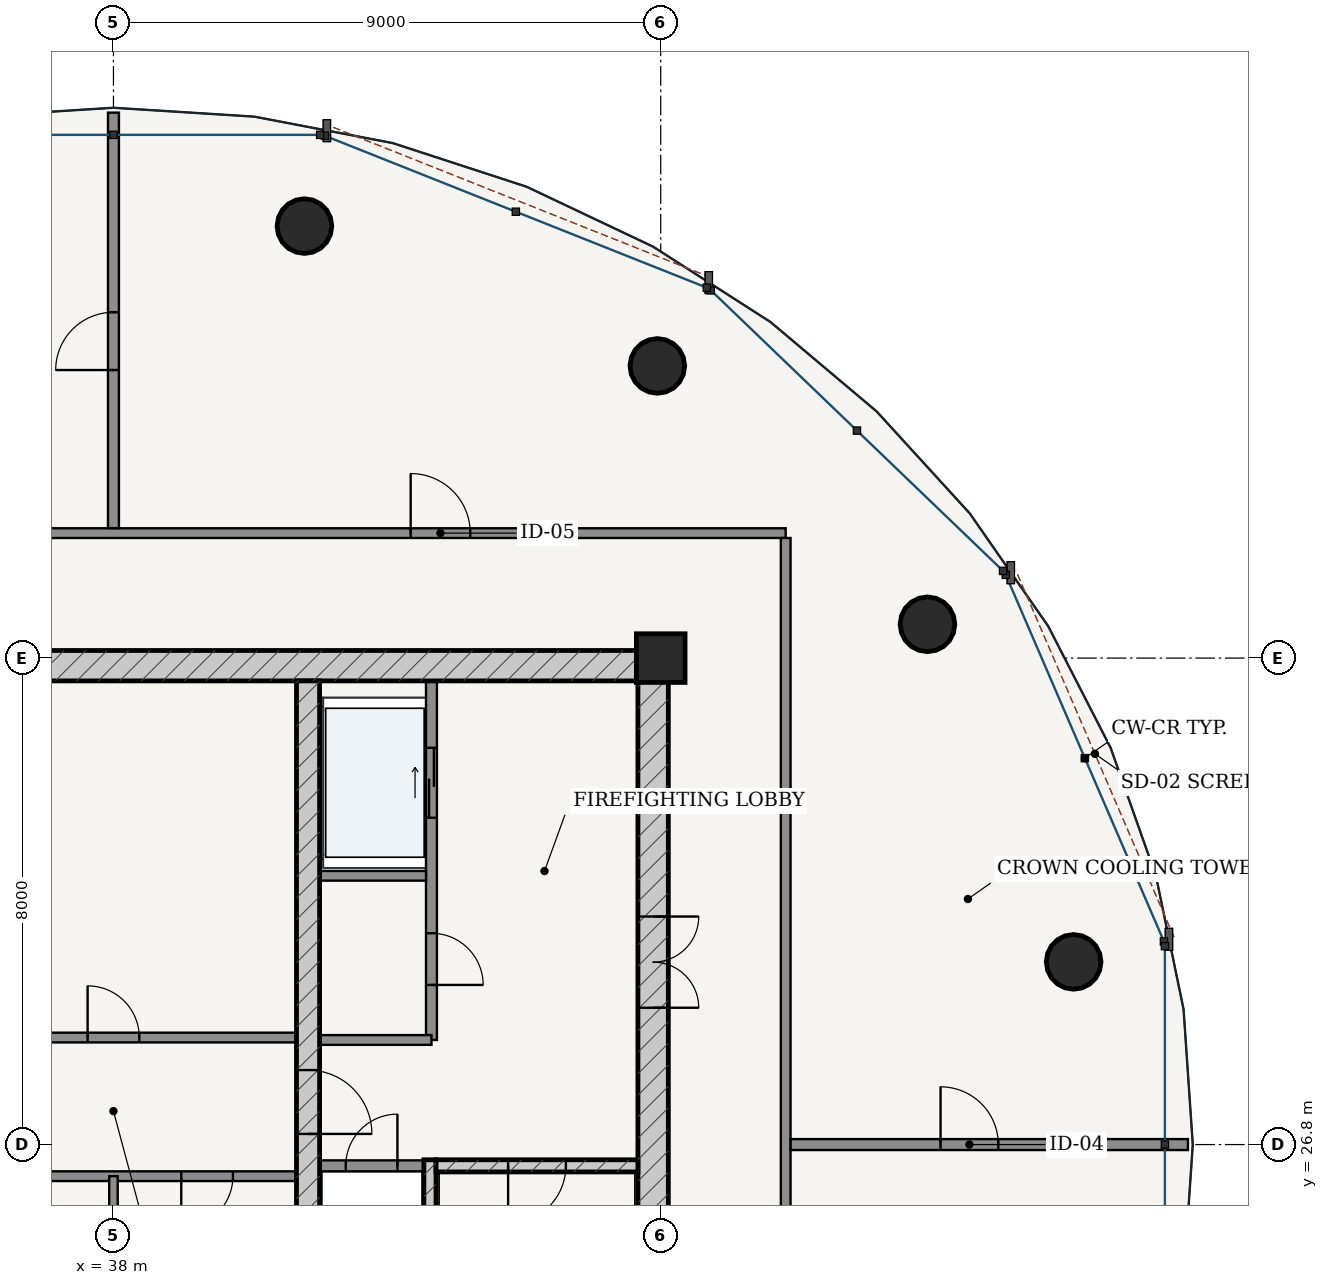
"""IFC4 building model, lengths in metres.
Left out: names, types, materials, properties, quantities, classifications, styles, units other than length and angle.
Written with IfcOpenShell. Run it as: python <this file> out.ifc"""

import sys

from ifc_helpers import new_model, si_unit, direction, frame, frame_2d, origin, origin_2d, place, context, subcontext, project, spatial, rectangle, hollow_circle, extrude, source, transform, mapped, element, fill, save


model = new_model("IFC4")
c1 = context("Model", 3, precision=1e-05, world=origin(), true_north=direction((-0.2419218956, 0.970295726276)))
c2 = subcontext(c1, "Body", "Model", "MODEL_VIEW")
j1 = project(units=[si_unit("LENGTHUNIT", "METRE"), si_unit("PLANEANGLEUNIT", "RADIAN")], contexts=[c1])
p1 = place(None, origin())
s1 = spatial("IfcSite", under=j1, at=p1, CompositionType="ELEMENT")
p2 = place(p1, origin())
s2 = spatial("IfcBuilding", under=s1, at=p2, CompositionType="ELEMENT")
p3 = place(p2, frame((0.0, 0.0, 316.5)))
s3 = spatial("IfcBuildingStorey", under=s2, at=p3, CompositionType="ELEMENT", Elevation=316.5)
p4 = place(p3, frame((47.0, 34.8, 0.0), z_axis=(0.0, 0.0, 1.0), x_axis=(1.0, 0.0, 0.0)))
e1 = element("IfcColumn", 1, at=p4, inside=s3, PredefinedType="COLUMN", context=c2, shape_type="SweptSolid", body=[
    extrude(rectangle(XDim=0.8, YDim=0.8, at=origin_2d()), origin(), (0.0, 0.0, 1.0), 5.2),
])
p5 = place(p3, frame((28.875, 34.675, 0.0), z_axis=(0.0, 0.0, 1.0), x_axis=(1.0, 0.0, 0.0)))
e2 = element("IfcWall", 2, at=p5, inside=s3, PredefinedType="SHEAR", context=c2, shape_type="SweptSolid", body=[
    extrude(rectangle(XDim=18.25, YDim=0.5, at=frame_2d((9.125, 0.0))), origin(), (0.0, 0.0, 1.0), 4.78),
])
p6 = place(p3, frame((46.875, 19.175, 0.0), z_axis=(0.0, 0.0, 1.0), x_axis=(0.0, 1.0, 0.0)))
e3 = element("IfcWall", 3, at=p6, inside=s3, PredefinedType="SHEAR", context=c2, shape_type="SweptSolid", body=[
    extrude(rectangle(XDim=15.25, YDim=0.5, at=frame_2d((7.625, 0.0))), origin(), (0.0, 0.0, 1.0), 4.78),
])
p7 = place(p6, frame((9.875, 0.0, 0.0)))
e4 = element("IfcOpeningElement", 4, at=p7, cuts=e3, PredefinedType="OPENING", context=c2, shape_type="SweptSolid", body=[
    extrude(rectangle(XDim=1.5, YDim=2.2, at=frame_2d((0.75, 1.1))), frame((0.0, 0.26, 0.0), z_axis=(0.0, -1.0, 0.0), x_axis=(1.0, 0.0, 0.0)), (0.0, 0.0, 1.0), 0.52),
])
p8 = place(p3, frame((43.205, 19.175, 0.0), z_axis=(0.0, 0.0, 1.0), x_axis=(0.0, 1.0, 0.0)))
e5 = element("IfcWall", 5, at=p8, inside=s3, PredefinedType="SOLIDWALL", context=c2, shape_type="SweptSolid", body=[
    extrude(rectangle(XDim=7.375, YDim=0.2, at=frame_2d((3.688, 0.0))), origin(), (0.0, 0.0, 1.0), 4.78),
])
p9 = place(p3, frame((43.305, 26.45, 0.0), z_axis=(0.0, 0.0, 1.0), x_axis=(1.0, 0.0, 0.0)))
e6 = element("IfcWall", 6, at=p9, inside=s3, PredefinedType="SOLIDWALL", context=c2, shape_type="SweptSolid", body=[
    extrude(rectangle(XDim=3.32, YDim=0.2, at=frame_2d((1.66, 0.0))), origin(), (0.0, 0.0, 1.0), 4.78),
])
p10 = place(p9, frame((1.185, 0.0, 0.0)))
e7 = element("IfcOpeningElement", 7, at=p10, cuts=e6, PredefinedType="OPENING", context=c2, shape_type="SweptSolid", body=[
    extrude(rectangle(XDim=0.95, YDim=2.15, at=frame_2d((0.475, 1.075))), frame((0.0, 0.11, 0.0), z_axis=(0.0, -1.0, 0.0), x_axis=(1.0, 0.0, 0.0)), (0.0, 0.0, 1.0), 0.22),
])
p11 = place(p3, frame((41.2, 19.175, 0.0), z_axis=(0.0, 0.0, 1.0), x_axis=(0.0, 1.0, 0.0)))
e8 = element("IfcWall", 8, at=p11, inside=s3, PredefinedType="SHEAR", context=c2, shape_type="SweptSolid", body=[
    extrude(rectangle(XDim=15.25, YDim=0.38, at=frame_2d((7.625, 0.0))), origin(), (0.0, 0.0, 1.0), 4.78),
])
p12 = place(p11, frame((7.8, 0.0, 0.0)))
e9 = element("IfcOpeningElement", 9, at=p12, cuts=e8, PredefinedType="OPENING", context=c2, shape_type="SweptSolid", body=[
    extrude(rectangle(XDim=1.05, YDim=2.15, at=frame_2d((0.525, 1.075))), frame((0.0, 0.2, 0.0), z_axis=(0.0, -1.0, 0.0), x_axis=(1.0, 0.0, 0.0)), (0.0, 0.0, 1.0), 0.4),
])
for number, where, z_axis, x_axis in (
    (10, (53.791, 29.804, 0.0), (0.0, 0.0, 1.0), (1.0, 0.0, 0.0)),
    (11, (51.387, 35.356, 0.0), (0.0, 0.0, 1.0), (1.0, 0.0, 0.0)),
    (12, (46.945, 39.605, 0.0), (0.0, 0.0, 1.0), (1.0, 0.0, 0.0)),
    (13, (41.141, 41.904, 0.0), (0.0, 0.0, 1.0), (1.0, 0.0, 0.0)),
):
    element("IfcColumn", number, at=place(p3, frame(where, z_axis=z_axis, x_axis=x_axis)), inside=s3, PredefinedType="COLUMN", context=c2, shape_type="SweptSolid", body=[
        extrude(hollow_circle(Radius=0.45, WallThickness=0.032, at=origin_2d()), origin(), (0.0, 0.0, 1.0), 5.2),
    ])
p13 = place(p3, frame((41.39, 26.45, 0.0), z_axis=(0.0, 0.0, 1.0), x_axis=(1.0, 0.0, 0.0)))
e14 = element("IfcWall", 14, at=p13, inside=s3, PredefinedType="PARTITIONING", context=c2, shape_type="SweptSolid", body=[
    extrude(rectangle(XDim=1.71, YDim=0.18, at=frame_2d((0.855, 0.0))), origin(), (0.0, 0.0, 1.0), 4.78),
])
p14 = place(p13, frame((0.43, 0.0, 0.0)))
e15 = element("IfcOpeningElement", 15, at=p14, cuts=e14, PredefinedType="OPENING", context=c2, shape_type="SweptSolid", body=[
    extrude(rectangle(XDim=0.85, YDim=2.1, at=frame_2d((0.425, 1.05))), frame((0.0, 0.1, 0.0), z_axis=(0.0, -1.0, 0.0), x_axis=(1.0, 0.0, 0.0)), (0.0, 0.0, 1.0), 0.2),
])
p15 = place(p3, frame((43.23, 28.52, 0.0), z_axis=(0.0, 0.0, 1.0), x_axis=(0.0, 1.0, 0.0)))
e16 = element("IfcWall", 16, at=p15, inside=s3, PredefinedType="PARTITIONING", context=c2, shape_type="SweptSolid", body=[
    extrude(rectangle(XDim=5.905, YDim=0.18, at=frame_2d((2.953, 0.0))), origin(), (0.0, 0.0, 1.0), 4.78),
])
p16 = place(p15, frame((0.905, 0.0, 0.0)))
e17 = element("IfcOpeningElement", 17, at=p16, cuts=e16, PredefinedType="OPENING", context=c2, shape_type="SweptSolid", body=[
    extrude(rectangle(XDim=0.85, YDim=2.1, at=frame_2d((0.425, 1.05))), frame((0.0, 0.1, 0.0), z_axis=(0.0, -1.0, 0.0), x_axis=(1.0, 0.0, 0.0)), (0.0, 0.0, 1.0), 0.2),
])
p17 = place(p15, frame((3.655, 0.0, 0.0)))
e18 = element("IfcOpeningElement", 18, at=p17, cuts=e16, PredefinedType="OPENING", context=c2, shape_type="SweptSolid", body=[
    extrude(rectangle(XDim=1.15, YDim=2.2, at=frame_2d((0.575, 1.1))), frame((0.0, 0.1, 0.0), z_axis=(0.0, -1.0, 0.0), x_axis=(1.0, 0.0, 0.0)), (0.0, 0.0, 1.0), 0.2),
])
p18 = place(p3, frame((41.39, 31.22, 0.0), z_axis=(0.0, 0.0, 1.0), x_axis=(1.0, 0.0, 0.0)))
e19 = element("IfcWall", 19, at=p18, inside=s3, PredefinedType="PARTITIONING", context=c2, shape_type="SweptSolid", body=[
    extrude(rectangle(XDim=1.75, YDim=0.16, at=frame_2d((0.875, 0.0))), origin(), (0.0, 0.0, 1.0), 4.78),
])
p19 = place(p3, frame((41.39, 28.52, 0.0), z_axis=(0.0, 0.0, 1.0), x_axis=(1.0, 0.0, 0.0)))
e20 = element("IfcWall", 20, at=p19, inside=s3, PredefinedType="PARTITIONING", context=c2, shape_type="SweptSolid", body=[
    extrude(rectangle(XDim=1.84, YDim=0.16, at=frame_2d((0.92, 0.0))), origin(), (0.0, 0.0, 1.0), 4.78),
])
p20 = place(p3, frame((34.99, 28.56, 0.0), z_axis=(0.0, 0.0, 1.0), x_axis=(1.0, 0.0, 0.0)))
e21 = element("IfcWall", 21, at=p20, inside=s3, PredefinedType="PARTITIONING", context=c2, shape_type="SweptSolid", body=[
    extrude(rectangle(XDim=6.02, YDim=0.16, at=frame_2d((3.01, 0.0))), origin(), (0.0, 0.0, 1.0), 4.78),
])
p21 = place(p20, frame((2.585, 0.0, 0.0)))
e22 = element("IfcOpeningElement", 22, at=p21, cuts=e21, PredefinedType="OPENING", context=c2, shape_type="SweptSolid", body=[
    extrude(rectangle(XDim=0.85, YDim=2.1, at=frame_2d((0.425, 1.05))), frame((0.0, 0.09, 0.0), z_axis=(0.0, -1.0, 0.0), x_axis=(1.0, 0.0, 0.0)), (0.0, 0.0, 1.0), 0.18),
])
p22 = place(p3, frame((34.99, 26.28, 0.0), z_axis=(0.0, 0.0, 1.0), x_axis=(1.0, 0.0, 0.0)))
e23 = element("IfcWall", 23, at=p22, inside=s3, PredefinedType="PARTITIONING", context=c2, shape_type="SweptSolid", body=[
    extrude(rectangle(XDim=6.02, YDim=0.16, at=frame_2d((3.01, 0.0))), origin(), (0.0, 0.0, 1.0), 4.78),
])
p23 = place(p22, frame((1.045, 0.0, 0.0)))
e24 = element("IfcOpeningElement", 24, at=p23, cuts=e23, PredefinedType="OPENING", context=c2, shape_type="SweptSolid", body=[
    extrude(rectangle(XDim=0.85, YDim=2.1, at=frame_2d((0.425, 1.05))), frame((0.0, 0.09, 0.0), z_axis=(0.0, -1.0, 0.0), x_axis=(1.0, 0.0, 0.0)), (0.0, 0.0, 1.0), 0.18),
])
p24 = place(p22, frame((4.125, 0.0, 0.0)))
e25 = element("IfcOpeningElement", 25, at=p24, cuts=e23, PredefinedType="OPENING", context=c2, shape_type="SweptSolid", body=[
    extrude(rectangle(XDim=0.85, YDim=2.1, at=frame_2d((0.425, 1.05))), frame((0.0, 0.09, 0.0), z_axis=(0.0, -1.0, 0.0), x_axis=(1.0, 0.0, 0.0)), (0.0, 0.0, 1.0), 0.18),
])
p25 = place(p3, frame((38.0, 23.72, 0.0), z_axis=(0.0, 0.0, 1.0), x_axis=(0.0, 1.0, 0.0)))
e26 = element("IfcWall", 26, at=p25, inside=s3, PredefinedType="PARTITIONING", context=c2, shape_type="SweptSolid", body=[
    extrude(rectangle(XDim=2.56, YDim=0.14, at=frame_2d((1.28, 0.0))), origin(), (0.0, 0.0, 1.0), 4.78),
])
p26 = place(p3, frame((26.945, 36.855, 0.0), z_axis=(0.0, 0.0, 1.0), x_axis=(1.0, 0.0, 0.0)))
e27 = element("IfcWall", 27, at=p26, inside=s3, PredefinedType="PARTITIONING", context=c2, shape_type="SweptSolid", body=[
    extrude(rectangle(XDim=22.11, YDim=0.16, at=frame_2d((11.055, 0.0))), origin(), (0.0, 0.0, 1.0), 4.352),
])
p27 = place(p26, frame((15.943, 0.0, 0.0)))
e28 = element("IfcOpeningElement", 28, at=p27, cuts=e27, PredefinedType="OPENING", context=c2, shape_type="SweptSolid", body=[
    extrude(rectangle(XDim=0.98, YDim=2.2, at=frame_2d((0.49, 1.1))), frame((0.0, 0.09, 0.0), z_axis=(0.0, -1.0, 0.0), x_axis=(1.0, 0.0, 0.0)), (0.0, 0.0, 1.0), 0.18),
])
p28 = place(p26, frame((5.187, 0.0, 0.0)))
e29 = element("IfcOpeningElement", 29, at=p28, cuts=e27, PredefinedType="OPENING", context=c2, shape_type="SweptSolid", body=[
    extrude(rectangle(XDim=0.98, YDim=2.2, at=frame_2d((0.49, 1.1))), frame((0.0, 0.09, 0.0), z_axis=(0.0, -1.0, 0.0), x_axis=(1.0, 0.0, 0.0)), (0.0, 0.0, 1.0), 0.18),
])
p29 = place(p3, frame((49.055, 16.825, 0.0), z_axis=(0.0, 0.0, 1.0), x_axis=(0.0, 1.0, 0.0)))
e30 = element("IfcWall", 30, at=p29, inside=s3, PredefinedType="PARTITIONING", context=c2, shape_type="SweptSolid", body=[
    extrude(rectangle(XDim=19.95, YDim=0.16, at=frame_2d((9.975, 0.0))), origin(), (0.0, 0.0, 1.0), 4.352),
])
p30 = place(p3, frame((49.137, 26.8, 0.0), z_axis=(0.0, 0.0, 1.0), x_axis=(1.0, 0.0, 0.0)))
e31 = element("IfcWall", 31, at=p30, inside=s3, PredefinedType="PARTITIONING", context=c2, shape_type="SweptSolid", body=[
    extrude(rectangle(XDim=6.533, YDim=0.18, at=frame_2d((3.267, 0.0))), origin(), (0.0, 0.0, 1.0), 4.411),
])
p31 = place(p30, frame((2.465, 0.0, 0.0)))
e32 = element("IfcOpeningElement", 32, at=p31, cuts=e31, PredefinedType="OPENING", context=c2, shape_type="SweptSolid", body=[
    extrude(rectangle(XDim=0.95, YDim=2.15, at=frame_2d((0.475, 1.075))), frame((0.0, 0.1, 0.0), z_axis=(0.0, -1.0, 0.0), x_axis=(1.0, 0.0, 0.0)), (0.0, 0.0, 1.0), 0.2),
])
p32 = place(p3, frame((38.0, 36.937, 0.0), z_axis=(0.0, 0.0, 1.0), x_axis=(0.0, 1.0, 0.0)))
e33 = element("IfcWall", 33, at=p32, inside=s3, PredefinedType="PARTITIONING", context=c2, shape_type="SweptSolid", body=[
    extrude(rectangle(XDim=6.833, YDim=0.18, at=frame_2d((3.417, 0.0))), origin(), (0.0, 0.0, 1.0), 4.411),
])
p33 = place(p32, frame((2.6, 0.0, 0.0)))
e34 = element("IfcOpeningElement", 34, at=p33, cuts=e33, PredefinedType="OPENING", context=c2, shape_type="SweptSolid", body=[
    extrude(rectangle(XDim=0.95, YDim=2.15, at=frame_2d((0.475, 1.075))), frame((0.0, 0.1, 0.0), z_axis=(0.0, -1.0, 0.0), x_axis=(1.0, 0.0, 0.0)), (0.0, 0.0, 1.0), 0.2),
])
m1 = source(origin(), c2, "Body", "SweptSolid", [
    extrude(rectangle(XDim=1.5, YDim=2.2, at=frame_2d((0.75, 1.1))), frame((0.0, 0.025, 0.0), z_axis=(0.0, -1.0, 0.0), x_axis=(1.0, 0.0, 0.0)), (0.0, 0.0, 1.0), 0.05),
])
p34 = place(p7, frame((1.5, 0.0, 0.0), z_axis=(0.0, 0.0, 1.0), x_axis=(-1.0, 0.0, 0.0)))
e35 = element("IfcDoor", 35, at=p34, inside=s3, OperationType="DOUBLE_DOOR_SINGLE_SWING", PredefinedType="DOOR", context=c2, shape_type="MappedRepresentation", body=[
    mapped(m1, transform((0.0, 0.0, 0.0), scale=1.0)),
])
fill(e4, e35)
m2 = source(origin(), c2, "Body", "SweptSolid", [
    extrude(rectangle(XDim=1.05, YDim=2.15, at=frame_2d((0.525, 1.075))), frame((0.0, 0.025, 0.0), z_axis=(0.0, -1.0, 0.0), x_axis=(1.0, 0.0, 0.0)), (0.0, 0.0, 1.0), 0.05),
])
p35 = place(p12, frame((1.05, 0.0, 0.0), z_axis=(0.0, 0.0, 1.0), x_axis=(-1.0, 0.0, 0.0)))
e36 = element("IfcDoor", 36, at=p35, inside=s3, OperationType="SINGLE_SWING_RIGHT", PredefinedType="DOOR", context=c2, shape_type="MappedRepresentation", body=[
    mapped(m2, transform((0.0, 0.0, 0.0), scale=1.0)),
])
fill(e9, e36)
m3 = source(origin(), c2, "Body", "SweptSolid", [
    extrude(rectangle(XDim=0.95, YDim=2.15, at=frame_2d((0.475, 1.075))), frame((0.0, 0.025, 0.0), z_axis=(0.0, -1.0, 0.0), x_axis=(1.0, 0.0, 0.0)), (0.0, 0.0, 1.0), 0.05),
])
p36 = place(p10, frame((0.95, 0.0, 0.0), z_axis=(0.0, 0.0, 1.0), x_axis=(-1.0, 0.0, 0.0)))
e37 = element("IfcDoor", 37, at=p36, inside=s3, OperationType="SINGLE_SWING_RIGHT", PredefinedType="DOOR", context=c2, shape_type="MappedRepresentation", body=[
    mapped(m3, transform((0.0, 0.0, 0.0), scale=1.0)),
])
fill(e7, e37)
m4 = source(origin(), c2, "Body", "SweptSolid", [
    extrude(rectangle(XDim=0.85, YDim=2.1, at=frame_2d((0.425, 1.05))), frame((0.0, 0.025, 0.0), z_axis=(0.0, -1.0, 0.0), x_axis=(1.0, 0.0, 0.0)), (0.0, 0.0, 1.0), 0.05),
])
p37 = place(p14, origin())
e38 = element("IfcDoor", 38, at=p37, inside=s3, OperationType="SINGLE_SWING_RIGHT", PredefinedType="DOOR", context=c2, shape_type="MappedRepresentation", body=[
    mapped(m4, transform((0.0, 0.0, 0.0), scale=1.0)),
])
fill(e15, e38)
p38 = place(p16, frame((0.85, 0.0, 0.0), z_axis=(0.0, 0.0, 1.0), x_axis=(-1.0, 0.0, 0.0)))
e39 = element("IfcDoor", 39, at=p38, inside=s3, OperationType="SINGLE_SWING_RIGHT", PredefinedType="DOOR", context=c2, shape_type="MappedRepresentation", body=[
    mapped(m4, transform((0.0, 0.0, 0.0), scale=1.0)),
])
fill(e17, e39)
p39 = place(p21, origin())
e40 = element("IfcDoor", 40, at=p39, inside=s3, OperationType="SINGLE_SWING_LEFT", PredefinedType="DOOR", context=c2, shape_type="MappedRepresentation", body=[
    mapped(m4, transform((0.0, 0.0, 0.0), scale=1.0)),
])
fill(e22, e40)
p40 = place(p24, frame((0.85, 0.0, 0.0), z_axis=(0.0, 0.0, 1.0), x_axis=(-1.0, 0.0, 0.0)))
e41 = element("IfcDoor", 41, at=p40, inside=s3, OperationType="SINGLE_SWING_RIGHT", PredefinedType="DOOR", context=c2, shape_type="MappedRepresentation", body=[
    mapped(m4, transform((0.0, 0.0, 0.0), scale=1.0)),
])
fill(e25, e41)
m5 = source(origin(), c2, "Body", "SweptSolid", [
    extrude(rectangle(XDim=1.15, YDim=2.2, at=frame_2d((0.575, 1.1))), frame((0.0, 0.025, 0.0), z_axis=(0.0, -1.0, 0.0), x_axis=(1.0, 0.0, 0.0)), (0.0, 0.0, 1.0), 0.05),
])
p41 = place(p17, origin())
e42 = element("IfcDoor", 42, at=p41, inside=s3, OperationType="DOUBLE_DOOR_SLIDING", PredefinedType="DOOR", context=c2, shape_type="MappedRepresentation", body=[
    mapped(m5, transform((0.0, 0.0, 0.0), scale=1.0)),
])
fill(e18, e42)
m6 = source(origin(), c2, "Body", "SweptSolid", [
    extrude(rectangle(XDim=0.98, YDim=2.2, at=frame_2d((0.49, 1.1))), frame((0.0, 0.025, 0.0), z_axis=(0.0, -1.0, 0.0), x_axis=(1.0, 0.0, 0.0)), (0.0, 0.0, 1.0), 0.05),
])
p42 = place(p27, origin())
e43 = element("IfcDoor", 43, at=p42, inside=s3, OperationType="SINGLE_SWING_LEFT", PredefinedType="DOOR", context=c2, shape_type="MappedRepresentation", body=[
    mapped(m6, transform((0.0, 0.0, 0.0), scale=1.0)),
])
fill(e28, e43)
p43 = place(p31, origin())
e44 = element("IfcDoor", 44, at=p43, inside=s3, OperationType="SINGLE_SWING_LEFT", PredefinedType="DOOR", context=c2, shape_type="MappedRepresentation", body=[
    mapped(m3, transform((0.0, 0.0, 0.0), scale=1.0)),
])
fill(e32, e44)
p44 = place(p33, origin())
e45 = element("IfcDoor", 45, at=p44, inside=s3, OperationType="SINGLE_SWING_LEFT", PredefinedType="DOOR", context=c2, shape_type="MappedRepresentation", body=[
    mapped(m3, transform((0.0, 0.0, 0.0), scale=1.0)),
])
fill(e34, e45)
save(model, sys.argv[1])
